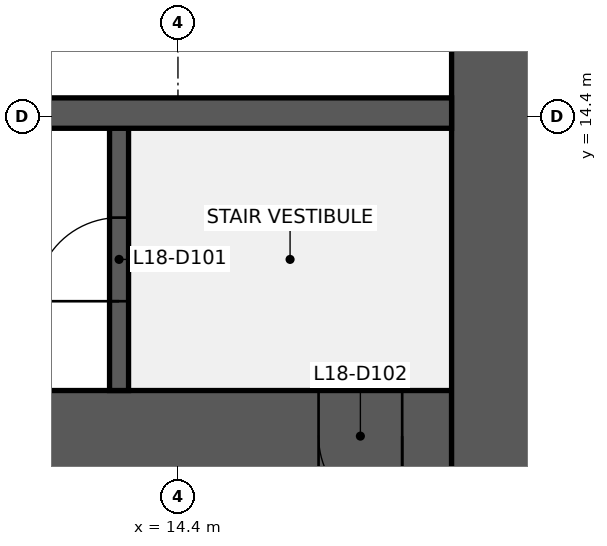
"""IFC4 building model, lengths in metres.
Left out: names, types, materials, properties, quantities, classifications, styles, units other than length and angle.
Written with IfcOpenShell. Run it as: python <this file> out.ifc"""

import sys

from ifc_helpers import new_model, si_unit, direction, frame, frame_2d, origin, place, context, subcontext, project, spatial, rectangle, extrude, element, fill, save


model = new_model("IFC4")
c1 = context("Model", 3, precision=1e-05, world=origin(), true_north=direction((0.0, 1.0)))
c2 = subcontext(c1, "Body", "Model", "MODEL_VIEW")
j1 = project(units=[si_unit("LENGTHUNIT", "METRE"), si_unit("PLANEANGLEUNIT", "RADIAN")], contexts=[c1])
p1 = place(None, origin())
s1 = spatial("IfcSite", under=j1, at=p1, CompositionType="ELEMENT")
p2 = place(p1, origin())
s2 = spatial("IfcBuilding", under=s1, at=p2, CompositionType="ELEMENT")
p3 = place(p2, frame((0.0, 0.0, 83.0)))
s3 = spatial("IfcBuildingStorey", under=s2, at=p3, CompositionType="ELEMENT", Elevation=83.0)
p4 = place(p3, frame((18.0, 10.2, 0.0), z_axis=(0.0, 0.0, 1.0), x_axis=(-1.0, 0.0, 0.0)))
e1 = element("IfcWall", 1, at=p4, inside=s3, PredefinedType="SHEAR", context=c2, shape_type="SweptSolid", body=[
    extrude(rectangle(XDim=13.2, YDim=1.2, at=frame_2d((6.6, 0.0))), origin(), (0.0, 0.0, 1.0), 3.7),
])
p5 = place(p4, frame((0.65, 0.0, 0.0)))
e2 = element("IfcOpeningElement", 2, at=p5, cuts=e1, PredefinedType="OPENING", context=c2, shape_type="SweptSolid", body=[
    extrude(rectangle(XDim=1.1, YDim=2.1, at=frame_2d((0.55, 1.05))), frame((0.0, 0.61, 0.0), z_axis=(0.0, -1.0, 0.0), x_axis=(1.0, 0.0, 0.0)), (0.0, 0.0, 1.0), 1.22),
])
p6 = place(p3, frame((18.6, 38.4, 0.0), z_axis=(0.0, 0.0, 1.0), x_axis=(0.0, -1.0, 0.0)))
e3 = element("IfcWall", 3, at=p6, inside=s3, PredefinedType="SHEAR", context=c2, shape_type="SweptSolid", body=[
    extrude(rectangle(XDim=28.8, YDim=1.2, at=frame_2d((14.4, 0.0))), origin(), (0.0, 0.0, 1.0), 3.7),
])
p7 = place(p6, frame((18.3, 0.0, 0.0)))
e4 = element("IfcOpeningElement", 4, at=p7, cuts=e3, PredefinedType="OPENING", context=c2, shape_type="SweptSolid", body=[
    extrude(rectangle(XDim=1.8, YDim=2.1, at=frame_2d((0.9, 1.05))), frame((0.0, 0.61, 0.0), z_axis=(0.0, -1.0, 0.0), x_axis=(1.0, 0.0, 0.0)), (0.0, 0.0, 1.0), 1.22),
])
p8 = place(p6, frame((8.7, 0.0, 0.0)))
e5 = element("IfcOpeningElement", 5, at=p8, cuts=e3, PredefinedType="OPENING", context=c2, shape_type="SweptSolid", body=[
    extrude(rectangle(XDim=1.8, YDim=2.1, at=frame_2d((0.9, 1.05))), frame((0.0, 0.61, 0.0), z_axis=(0.0, -1.0, 0.0), x_axis=(1.0, 0.0, 0.0)), (0.0, 0.0, 1.0), 1.22),
])
p9 = place(p3, frame((13.625, 10.8, 0.0), z_axis=(0.0, 0.0, 1.0), x_axis=(0.0, 1.0, 0.0)))
e6 = element("IfcWall", 6, at=p9, inside=s3, PredefinedType="SHEAR", context=c2, shape_type="SweptSolid", body=[
    extrude(rectangle(XDim=3.45, YDim=0.25, at=frame_2d((1.725, 0.0))), origin(), (0.0, 0.0, 1.0), 3.7),
])
p10 = place(p9, frame((1.175, 0.0, 0.0)))
e7 = element("IfcOpeningElement", 7, at=p10, cuts=e6, PredefinedType="OPENING", context=c2, shape_type="SweptSolid", body=[
    extrude(rectangle(XDim=1.1, YDim=2.1, at=frame_2d((0.55, 1.05))), frame((0.0, 0.135, 0.0), z_axis=(0.0, -1.0, 0.0), x_axis=(1.0, 0.0, 0.0)), (0.0, 0.0, 1.0), 0.27),
])
p11 = place(p3, frame((1.2, 14.45, 0.0), z_axis=(0.0, 0.0, 1.0), x_axis=(1.0, 0.0, 0.0)))
e8 = element("IfcWall", 8, at=p11, inside=s3, PredefinedType="SHEAR", context=c2, shape_type="SweptSolid", body=[
    extrude(rectangle(XDim=16.8, YDim=0.4, at=frame_2d((8.4, 0.0))), origin(), (0.0, 0.0, 1.0), 3.7),
])
p12 = place(p10, origin())
e9 = element("IfcDoor", 9, at=p12, inside=s3, OperationType="SINGLE_SWING_LEFT", PredefinedType="DOOR", context=c2, shape_type="SweptSolid", body=[
    extrude(rectangle(XDim=1.1, YDim=2.1, at=frame_2d((0.55, 1.05))), frame((0.0, 0.025, 0.0), z_axis=(0.0, -1.0, 0.0), x_axis=(1.0, 0.0, 0.0)), (0.0, 0.0, 1.0), 0.05),
])
fill(e7, e9)
p13 = place(p5, origin())
e10 = element("IfcDoor", 10, at=p13, inside=s3, OperationType="SINGLE_SWING_LEFT", PredefinedType="DOOR", context=c2, shape_type="SweptSolid", body=[
    extrude(rectangle(XDim=1.1, YDim=2.1, at=frame_2d((0.55, 1.05))), frame((0.0, 0.025, 0.0), z_axis=(0.0, -1.0, 0.0), x_axis=(1.0, 0.0, 0.0)), (0.0, 0.0, 1.0), 0.05),
])
fill(e2, e10)
save(model, sys.argv[1])
